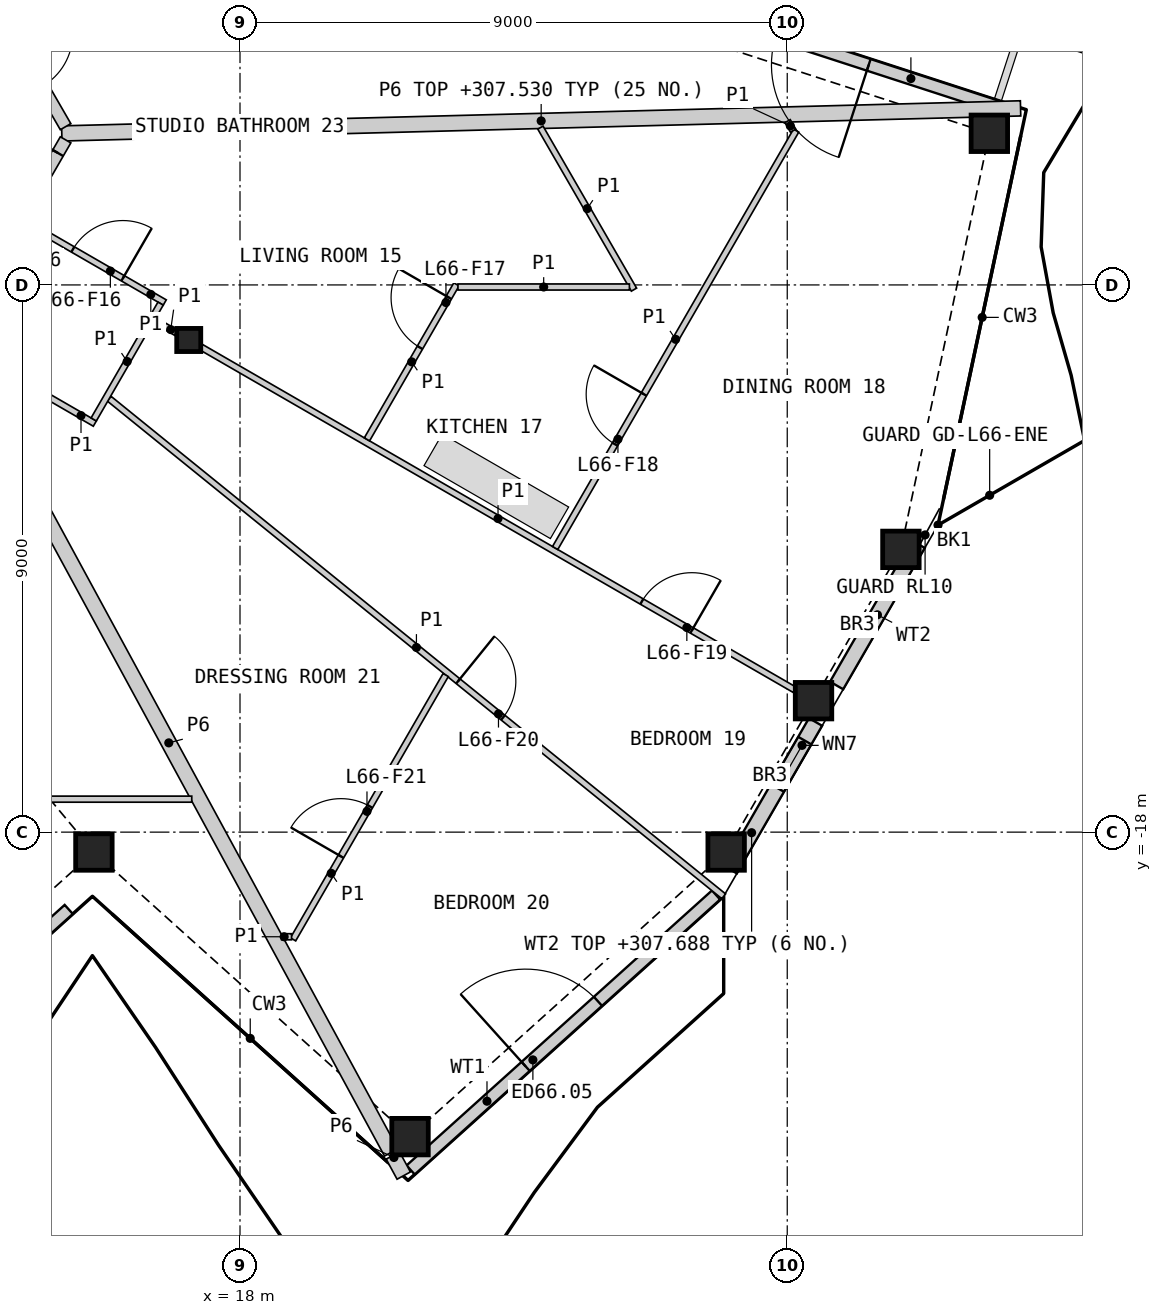
"""IFC4 building model, lengths in metres.
Left out: names, types, materials, properties, quantities, classifications, styles, units other than length and angle.
Written with IfcOpenShell. Run it as: python <this file> out.ifc"""

import sys

from ifc_helpers import new_model, si_unit, direction, frame, frame_2d, origin, origin_2d, place, context, subcontext, project, spatial, rectangle, hollow_rectangle, i_section, extrude, element, fill, save


model = new_model("IFC4")
c1 = context("Model", 3, precision=1e-05, world=origin(), true_north=direction((0.0, 1.0)))
c2 = subcontext(c1, "Body", "Model", "MODEL_VIEW")
j1 = project(units=[si_unit("LENGTHUNIT", "METRE"), si_unit("PLANEANGLEUNIT", "RADIAN")], contexts=[c1])
p1 = place(None, origin())
s1 = spatial("IfcSite", under=j1, at=p1, CompositionType="ELEMENT")
p2 = place(p1, origin())
s2 = spatial("IfcBuilding", under=s1, at=p2, CompositionType="ELEMENT")
p3 = place(p2, frame((0.0, 0.0, 305.2)))
s3 = spatial("IfcBuildingStorey", under=s2, at=p3, CompositionType="ELEMENT", Elevation=305.2)
for number, where, z_axis, x_axis in (
    (1, (15.597, -18.327, 0.0), (0.0, 0.0, 1.0), (1.0, 0.0, 0.0)),
    (2, (20.796, -23.008, 0.0), (0.0, 0.0, 1.0), (1.0, 0.0, 0.0)),
    (3, (25.995, -18.327, 0.0), (0.0, 0.0, 1.0), (1.0, 0.0, 0.0)),
    (4, (27.432, -15.838, 0.0), (0.0, 0.0, 1.0), (1.0, 0.0, 0.0)),
    (5, (28.869, -13.349, 0.0), (0.0, 0.0, 1.0), (1.0, 0.0, 0.0)),
    (6, (30.324, -6.506, 0.0), (0.0, 0.0, 1.0), (1.0, 0.0, 0.0)),
):
    element("IfcColumn", number, at=place(p3, frame(where, z_axis=z_axis, x_axis=x_axis)), inside=s3, PredefinedType="COLUMN", context=c2, shape_type="SweptSolid", body=[
        extrude(hollow_rectangle(XDim=0.6, YDim=0.6, WallThickness=0.04, at=origin_2d()), origin(), (0.0, 0.0, 1.0), 3.4),
    ])
p4 = place(p3, frame((17.157, -9.906, 0.0), z_axis=(0.0, 0.0, 1.0), x_axis=(1.0, 0.0, 0.0)))
e7 = element("IfcColumn", 7, at=p4, inside=s3, PredefinedType="COLUMN", context=c2, shape_type="SweptSolid", body=[
    extrude(i_section(OverallWidth=0.396, OverallDepth=0.381, WebThickness=0.019, FlangeThickness=0.03, at=origin_2d()), origin(), (0.0, 0.0, 1.0), 3.4),
])
p5 = place(p3, frame((10.485, -23.501, 0.0), z_axis=(0.0, 0.0, 1.0), x_axis=(0.743134744054, 0.669141802745, 0.0)))
e8 = element("IfcWall", 8, at=p5, inside=s3, PredefinedType="SOLIDWALL", context=c2, shape_type="SweptSolid", body=[
    extrude(rectangle(XDim=6.322, YDim=0.2, at=frame_2d((3.161, 0.0))), origin(), (0.0, 0.0, 1.0), 2.488),
])
p6 = place(p5, frame((2.463, 0.0, 0.0)))
e9 = element("IfcOpeningElement", 9, at=p6, cuts=e8, PredefinedType="OPENING", context=c2, shape_type="SweptSolid", body=[
    extrude(rectangle(XDim=1.6, YDim=2.25, at=frame_2d((0.8, 1.125))), frame((0.0, 0.11, 0.0), z_axis=(0.0, -1.0, 0.0), x_axis=(1.0, 0.0, 0.0)), (0.0, 0.0, 1.0), 0.22),
])
p7 = place(p3, frame((20.806, -23.556, 0.0), z_axis=(0.0, 0.0, 1.0), x_axis=(0.743145048269, 0.669130358924, 0.0)))
e10 = element("IfcWall", 10, at=p7, inside=s3, PredefinedType="SOLIDWALL", context=c2, shape_type="SweptSolid", body=[
    extrude(rectangle(XDim=6.759, YDim=0.2, at=frame_2d((3.379, 0.0))), origin(), (0.0, 0.0, 1.0), 2.488),
])
p8 = place(p7, frame((2.545, 0.0, 0.0)))
e11 = element("IfcOpeningElement", 11, at=p8, cuts=e10, PredefinedType="OPENING", context=c2, shape_type="SweptSolid", body=[
    extrude(rectangle(XDim=1.6, YDim=2.25, at=frame_2d((0.8, 1.125))), frame((0.0, 0.11, 0.0), z_axis=(0.0, -1.0, 0.0), x_axis=(1.0, 0.0, 0.0)), (0.0, 0.0, 1.0), 0.22),
])
p9 = place(p3, frame((26.063, -18.617, 0.0), z_axis=(0.0, 0.0, 1.0), x_axis=(0.499968627931, 0.866043515699, 0.0)))
e12 = element("IfcWall", 12, at=p9, inside=s3, PredefinedType="SOLIDWALL", context=c2, shape_type="SweptSolid", body=[
    extrude(rectangle(XDim=2.804, YDim=0.25, at=frame_2d((1.402, 0.0))), origin(), (0.0, 0.0, 1.0), 2.488),
])
p10 = place(p9, frame((1.55, 0.0, 1.6)))
e13 = element("IfcOpeningElement", 13, at=p10, cuts=e12, PredefinedType="OPENING", context=c2, shape_type="SweptSolid", body=[
    extrude(rectangle(XDim=0.9, YDim=0.6, at=frame_2d((0.45, 0.3))), frame((0.0, 0.135, 0.0), z_axis=(0.0, -1.0, 0.0), x_axis=(1.0, 0.0, 0.0)), (0.0, 0.0, 1.0), 0.27),
])
p11 = place(p3, frame((27.812, -15.588, 0.0), z_axis=(0.0, 0.0, 1.0), x_axis=(0.500032109083, 0.866006864803, 0.0)))
e14 = element("IfcWall", 14, at=p11, inside=s3, PredefinedType="SOLIDWALL", context=c2, shape_type="SweptSolid", body=[
    extrude(rectangle(XDim=2.684, YDim=0.25, at=frame_2d((1.342, 0.0))), origin(), (0.0, 0.0, 1.0), 2.488),
])
p12 = place(p3, frame((30.488, -6.078, 0.0), z_axis=(0.0, 0.0, 1.0), x_axis=(-0.951062515241, 0.308998530908, 0.0)))
e15 = element("IfcWall", 15, at=p12, inside=s3, PredefinedType="SOLIDWALL", context=c2, shape_type="SweptSolid", body=[
    extrude(rectangle(XDim=6.117, YDim=0.2, at=frame_2d((3.059, 0.0))), origin(), (0.0, 0.0, 1.0), 2.488),
])
p13 = place(p12, frame((2.259, 0.0, 0.0)))
e16 = element("IfcOpeningElement", 16, at=p13, cuts=e15, PredefinedType="OPENING", context=c2, shape_type="SweptSolid", body=[
    extrude(rectangle(XDim=1.6, YDim=2.25, at=frame_2d((0.8, 1.125))), frame((0.0, 0.11, 0.0), z_axis=(0.0, -1.0, 0.0), x_axis=(1.0, 0.0, 0.0)), (0.0, 0.0, 1.0), 0.22),
])
p14 = place(p3, frame((15.069, -6.509, 0.0), z_axis=(0.0, 0.0, 1.0), x_axis=(0.999657828615, 0.026157708023, 0.0)))
e17 = element("IfcWall", 17, at=p14, inside=s3, PredefinedType="PARTITIONING", context=c2, shape_type="SweptSolid", body=[
    extrude(rectangle(XDim=15.773, YDim=0.25, at=frame_2d((7.887, 0.0))), origin(), (0.0, 0.0, 1.0), 2.33),
])
p15 = place(p3, frame((13.171, -9.796, 0.0), z_axis=(0.0, 0.0, 1.0), x_axis=(0.477178668135, -0.878806303275, 0.0)))
e18 = element("IfcWall", 18, at=p15, inside=s3, PredefinedType="PARTITIONING", context=c2, shape_type="SweptSolid", body=[
    extrude(rectangle(XDim=15.33, YDim=0.25, at=frame_2d((7.665, 0.0))), origin(), (0.0, 0.0, 1.0), 2.33),
])
p16 = place(p3, frame((12.988, -2.684, 0.0), z_axis=(0.0, 0.0, 1.0), x_axis=(0.500003406062, -0.866023437285, 0.0)))
e19 = element("IfcWall", 19, at=p16, inside=s3, PredefinedType="PARTITIONING", context=c2, shape_type="SweptSolid", body=[
    extrude(rectangle(XDim=4.288, YDim=0.2, at=frame_2d((2.144, 0.0))), origin(), (0.0, 0.0, 1.0), 3.1),
])
p17 = place(p16, frame((2.521, 0.0, 0.0)))
e20 = element("IfcOpeningElement", 20, at=p17, cuts=e19, PredefinedType="OPENING", context=c2, shape_type="SweptSolid", body=[
    extrude(rectangle(XDim=1.0, YDim=2.1, at=frame_2d((0.5, 1.05))), frame((0.0, 0.11, 0.0), z_axis=(0.0, -1.0, 0.0), x_axis=(1.0, 0.0, 0.0)), (0.0, 0.0, 1.0), 0.22),
])
p18 = place(p3, frame((13.293, -9.797, 0.0), z_axis=(0.0, 0.0, 1.0), x_axis=(0.499967746641, 0.866044024469, 0.0)))
e21 = element("IfcWall", 21, at=p18, inside=s3, PredefinedType="PARTITIONING", context=c2, shape_type="SweptSolid", body=[
    extrude(rectangle(XDim=3.676, YDim=0.2, at=frame_2d((1.838, 0.0))), origin(), (0.0, 0.0, 1.0), 3.1),
])
p19 = place(p18, frame((2.426, 0.0, 0.0)))
e22 = element("IfcOpeningElement", 22, at=p19, cuts=e21, PredefinedType="OPENING", context=c2, shape_type="SweptSolid", body=[
    extrude(rectangle(XDim=1.0, YDim=2.1, at=frame_2d((0.5, 1.05))), frame((0.0, 0.11, 0.0), z_axis=(0.0, -1.0, 0.0), x_axis=(1.0, 0.0, 0.0)), (0.0, 0.0, 1.0), 0.22),
])
p20 = place(p3, frame((20.514, -23.318, 0.0), z_axis=(0.0, 0.0, 1.0), x_axis=(0.477077538769, -0.878861207474, 0.0)))
e23 = element("IfcWall", 23, at=p20, inside=s3, PredefinedType="PARTITIONING", context=c2, shape_type="SweptSolid", body=[
    extrude(rectangle(XDim=0.376, YDim=0.25, at=frame_2d((0.188, 0.0))), origin(), (0.0, 0.0, 1.0), 2.33),
])
p21 = place(p3, frame((15.848, -10.871, 0.0), z_axis=(0.0, 0.0, 1.0), x_axis=(0.77713687197, -0.629331615465, 0.0)))
e24 = element("IfcWall", 24, at=p21, inside=s3, PredefinedType="PARTITIONING", context=c2, shape_type="SweptSolid", body=[
    extrude(rectangle(XDim=13.004, YDim=0.1, at=frame_2d((6.502, 0.0))), origin(), (0.0, 0.0, 1.0), 2.33),
])
p22 = place(p21, frame((7.384, 0.0, 0.0)))
e25 = element("IfcOpeningElement", 25, at=p22, cuts=e24, PredefinedType="OPENING", context=c2, shape_type="SweptSolid", body=[
    extrude(rectangle(XDim=0.95, YDim=2.1, at=frame_2d((0.475, 1.05))), frame((0.0, 0.06, 0.0), z_axis=(0.0, -1.0, 0.0), x_axis=(1.0, 0.0, 0.0)), (0.0, 0.0, 1.0), 0.12),
])
p23 = place(p3, frame((17.365, -10.025, 0.0), z_axis=(0.0, 0.0, 1.0), x_axis=(0.866021046153, -0.500007547564, 0.0)))
e26 = element("IfcWall", 26, at=p23, inside=s3, PredefinedType="PARTITIONING", context=c2, shape_type="SweptSolid", body=[
    extrude(rectangle(XDim=11.267, YDim=0.1, at=frame_2d((5.634, 0.0))), origin(), (0.0, 0.0, 1.0), 2.33),
])
p24 = place(p23, frame((8.364, 0.0, 0.0)))
e27 = element("IfcOpeningElement", 27, at=p24, cuts=e26, PredefinedType="OPENING", context=c2, shape_type="SweptSolid", body=[
    extrude(rectangle(XDim=0.95, YDim=2.1, at=frame_2d((0.475, 1.05))), frame((0.0, 0.06, 0.0), z_axis=(0.0, -1.0, 0.0), x_axis=(1.0, 0.0, 0.0)), (0.0, 0.0, 1.0), 0.12),
])
p25 = place(p3, frame((23.183, -13.327, 0.0), z_axis=(0.0, 0.0, 1.0), x_axis=(0.499991741039, 0.866030172045, 0.0)))
e28 = element("IfcWall", 28, at=p25, inside=s3, PredefinedType="PARTITIONING", context=c2, shape_type="SweptSolid", body=[
    extrude(rectangle(XDim=7.927, YDim=0.1, at=frame_2d((3.963, 0.0))), origin(), (0.0, 0.0, 1.0), 2.33),
])
p26 = place(p25, frame((1.97, 0.0, 0.0)))
e29 = element("IfcOpeningElement", 29, at=p26, cuts=e28, PredefinedType="OPENING", context=c2, shape_type="SweptSolid", body=[
    extrude(rectangle(XDim=0.95, YDim=2.1, at=frame_2d((0.475, 1.05))), frame((0.0, 0.06, 0.0), z_axis=(0.0, -1.0, 0.0), x_axis=(1.0, 0.0, 0.0)), (0.0, 0.0, 1.0), 0.12),
])
p27 = place(p3, frame((10.432, -17.458, 0.0), z_axis=(0.0, 0.0, 1.0), x_axis=(1.0, 0.0, 0.0)))
e30 = element("IfcWall", 30, at=p27, inside=s3, PredefinedType="PARTITIONING", context=c2, shape_type="SweptSolid", body=[
    extrude(rectangle(XDim=6.775, YDim=0.1, at=frame_2d((3.387, 0.0))), origin(), (0.0, 0.0, 1.0), 2.33),
])
p28 = place(p27, frame((0.752, 0.0, 0.0)))
e31 = element("IfcOpeningElement", 31, at=p28, cuts=e30, PredefinedType="OPENING", context=c2, shape_type="SweptSolid", body=[
    extrude(rectangle(XDim=0.95, YDim=2.1, at=frame_2d((0.475, 1.05))), frame((0.0, 0.06, 0.0), z_axis=(0.0, -1.0, 0.0), x_axis=(1.0, 0.0, 0.0)), (0.0, 0.0, 1.0), 0.12),
])
p29 = place(p3, frame((18.873, -19.764, 0.0), z_axis=(0.0, 0.0, 1.0), x_axis=(0.499983455602, 0.866034955486, 0.0)))
e32 = element("IfcWall", 32, at=p29, inside=s3, PredefinedType="PARTITIONING", context=c2, shape_type="SweptSolid", body=[
    extrude(rectangle(XDim=5.02, YDim=0.1, at=frame_2d((2.51, 0.0))), origin(), (0.0, 0.0, 1.0), 2.33),
])
p30 = place(p29, frame((1.576, 0.0, 0.0)))
e33 = element("IfcOpeningElement", 33, at=p30, cuts=e32, PredefinedType="OPENING", context=c2, shape_type="SweptSolid", body=[
    extrude(rectangle(XDim=0.95, YDim=2.1, at=frame_2d((0.475, 1.05))), frame((0.0, 0.06, 0.0), z_axis=(0.0, -1.0, 0.0), x_axis=(1.0, 0.0, 0.0)), (0.0, 0.0, 1.0), 0.12),
])
p31 = place(p3, frame((22.941, -6.413, 0.0), z_axis=(0.0, 0.0, 1.0), x_axis=(0.500013199183, -0.866017783098, 0.0)))
e34 = element("IfcWall", 34, at=p31, inside=s3, PredefinedType="PARTITIONING", context=c2, shape_type="SweptSolid", body=[
    extrude(rectangle(XDim=3.077, YDim=0.1, at=frame_2d((1.539, 0.0))), origin(), (0.0, 0.0, 1.0), 2.33),
])
p32 = place(p3, frame((20.088, -11.54, 0.0), z_axis=(0.0, 0.0, 1.0), x_axis=(0.500055103712, 0.865993587304, 0.0)))
e35 = element("IfcWall", 35, at=p32, inside=s3, PredefinedType="PARTITIONING", context=c2, shape_type="SweptSolid", body=[
    extrude(rectangle(XDim=2.944, YDim=0.1, at=frame_2d((1.472, 0.0))), origin(), (0.0, 0.0, 1.0), 2.33),
])
p33 = place(p32, frame((1.744, 0.0, 0.0)))
e36 = element("IfcOpeningElement", 36, at=p33, cuts=e35, PredefinedType="OPENING", context=c2, shape_type="SweptSolid", body=[
    extrude(rectangle(XDim=0.95, YDim=2.1, at=frame_2d((0.475, 1.05))), frame((0.0, 0.06, 0.0), z_axis=(0.0, -1.0, 0.0), x_axis=(1.0, 0.0, 0.0)), (0.0, 0.0, 1.0), 0.12),
])
p34 = place(p3, frame((21.584, -9.034, 0.0), z_axis=(0.0, 0.0, 1.0), x_axis=(1.0, 0.0, 0.0)))
e37 = element("IfcWall", 37, at=p34, inside=s3, PredefinedType="PARTITIONING", context=c2, shape_type="SweptSolid", body=[
    extrude(rectangle(XDim=2.82, YDim=0.1, at=frame_2d((1.41, 0.0))), origin(), (0.0, 0.0, 1.0), 2.33),
])
p35 = place(p3, frame((14.468, -7.964, 0.0), z_axis=(0.0, 0.0, 1.0), x_axis=(0.865989200783, -0.500062700197, 0.0)))
e38 = element("IfcWall", 38, at=p35, inside=s3, PredefinedType="PARTITIONING", context=c2, shape_type="SweptSolid", body=[
    extrude(rectangle(XDim=2.65, YDim=0.1, at=frame_2d((1.325, 0.0))), origin(), (0.0, 0.0, 1.0), 2.33),
])
p36 = place(p35, frame((0.905, 0.0, 0.0)))
e39 = element("IfcOpeningElement", 39, at=p36, cuts=e38, PredefinedType="OPENING", context=c2, shape_type="SweptSolid", body=[
    extrude(rectangle(XDim=0.95, YDim=2.1, at=frame_2d((0.475, 1.05))), frame((0.0, 0.06, 0.0), z_axis=(0.0, -1.0, 0.0), x_axis=(1.0, 0.0, 0.0)), (0.0, 0.0, 1.0), 0.12),
])
p37 = place(p3, frame((13.339, -9.968, 0.0), z_axis=(0.0, 0.0, 1.0), x_axis=(0.866036909293, -0.499980071345, 0.0)))
e40 = element("IfcWall", 40, at=p37, inside=s3, PredefinedType="PARTITIONING", context=c2, shape_type="SweptSolid", body=[
    extrude(rectangle(XDim=2.625, YDim=0.1, at=frame_2d((1.312, 0.0))), origin(), (0.0, 0.0, 1.0), 2.33),
])
p38 = place(p3, frame((15.594, -11.212, 0.0), z_axis=(0.0, 0.0, 1.0), x_axis=(0.499898558967, 0.866083962871, 0.0)))
e41 = element("IfcWall", 41, at=p38, inside=s3, PredefinedType="PARTITIONING", context=c2, shape_type="SweptSolid", body=[
    extrude(rectangle(XDim=2.2, YDim=0.1, at=frame_2d((1.1, 0.0))), origin(), (0.0, 0.0, 1.0), 2.33),
])
p39 = place(p3, frame((16.594, -9.581, 0.0), z_axis=(0.0, 0.0, 1.0), x_axis=(0.866036909293, -0.499980071345, 0.0)))
e42 = element("IfcWall", 42, at=p39, inside=s3, PredefinedType="PARTITIONING", context=c2, shape_type="SweptSolid", body=[
    extrude(rectangle(XDim=0.41, YDim=0.1, at=frame_2d((0.205, 0.0))), origin(), (0.0, 0.0, 1.0), 2.33),
])
p40 = place(p3, frame((27.006, -6.306, 0.0), z_axis=(0.0, 0.0, 1.0), x_axis=(0.500074377092, -0.865982457891, 0.0)))
e43 = element("IfcWall", 43, at=p40, inside=s3, PredefinedType="PARTITIONING", context=c2, shape_type="SweptSolid", body=[
    extrude(rectangle(XDim=0.18, YDim=0.1, at=frame_2d((0.09, 0.0))), origin(), (0.0, 0.0, 1.0), 2.33),
])
p41 = place(p3, frame((18.685, -19.721, 0.0), z_axis=(0.0, 0.0, 1.0), x_axis=(1.0, 0.0, 0.0)))
e44 = element("IfcWall", 44, at=p41, inside=s3, PredefinedType="PARTITIONING", context=c2, shape_type="SweptSolid", body=[
    extrude(rectangle(XDim=0.162, YDim=0.1, at=frame_2d((0.081, 0.0))), origin(), (0.0, 0.0, 1.0), 2.33),
])
p42 = place(p8, origin())
e45 = element("IfcDoor", 45, at=p42, inside=s3, OperationType="DOUBLE_DOOR_SINGLE_SWING", PredefinedType="DOOR", context=c2, shape_type="SweptSolid", body=[
    extrude(rectangle(XDim=1.6, YDim=2.25, at=frame_2d((0.8, 1.125))), frame((0.0, 0.025, 0.0), z_axis=(0.0, -1.0, 0.0), x_axis=(1.0, 0.0, 0.0)), (0.0, 0.0, 1.0), 0.05),
])
fill(e11, e45)
p43 = place(p10, origin())
e46 = element("IfcWindow", 46, at=p43, inside=s3, PartitioningType="SINGLE_PANEL", PredefinedType="WINDOW", context=c2, shape_type="SweptSolid", body=[
    extrude(rectangle(XDim=0.9, YDim=0.6, at=frame_2d((0.45, 0.3))), frame((0.0, 0.03, 0.0), z_axis=(0.0, -1.0, 0.0), x_axis=(1.0, 0.0, 0.0)), (0.0, 0.0, 1.0), 0.06),
])
fill(e13, e46)
p44 = place(p13, origin())
e47 = element("IfcDoor", 47, at=p44, inside=s3, OperationType="DOUBLE_DOOR_SINGLE_SWING", PredefinedType="DOOR", context=c2, shape_type="SweptSolid", body=[
    extrude(rectangle(XDim=1.6, YDim=2.25, at=frame_2d((0.8, 1.125))), frame((0.0, 0.025, 0.0), z_axis=(0.0, -1.0, 0.0), x_axis=(1.0, 0.0, 0.0)), (0.0, 0.0, 1.0), 0.05),
])
fill(e16, e47)
p45 = place(p19, origin())
e48 = element("IfcDoor", 48, at=p45, inside=s3, OperationType="SINGLE_SWING_RIGHT", PredefinedType="DOOR", context=c2, shape_type="SweptSolid", body=[
    extrude(rectangle(XDim=1.0, YDim=2.1, at=frame_2d((0.5, 1.05))), frame((0.0, 0.025, 0.0), z_axis=(0.0, -1.0, 0.0), x_axis=(1.0, 0.0, 0.0)), (0.0, 0.0, 1.0), 0.05),
])
fill(e22, e48)
p46 = place(p36, origin())
e49 = element("IfcDoor", 49, at=p46, inside=s3, OperationType="SINGLE_SWING_RIGHT", PredefinedType="DOOR", context=c2, shape_type="SweptSolid", body=[
    extrude(rectangle(XDim=0.95, YDim=2.1, at=frame_2d((0.475, 1.05))), frame((0.0, 0.025, 0.0), z_axis=(0.0, -1.0, 0.0), x_axis=(1.0, 0.0, 0.0)), (0.0, 0.0, 1.0), 0.05),
])
fill(e39, e49)
p47 = place(p33, origin())
e50 = element("IfcDoor", 50, at=p47, inside=s3, OperationType="SINGLE_SWING_RIGHT", PredefinedType="DOOR", context=c2, shape_type="SweptSolid", body=[
    extrude(rectangle(XDim=0.95, YDim=2.1, at=frame_2d((0.475, 1.05))), frame((0.0, 0.025, 0.0), z_axis=(0.0, -1.0, 0.0), x_axis=(1.0, 0.0, 0.0)), (0.0, 0.0, 1.0), 0.05),
])
fill(e36, e50)
p48 = place(p26, origin())
e51 = element("IfcDoor", 51, at=p48, inside=s3, OperationType="SINGLE_SWING_RIGHT", PredefinedType="DOOR", context=c2, shape_type="SweptSolid", body=[
    extrude(rectangle(XDim=0.95, YDim=2.1, at=frame_2d((0.475, 1.05))), frame((0.0, 0.025, 0.0), z_axis=(0.0, -1.0, 0.0), x_axis=(1.0, 0.0, 0.0)), (0.0, 0.0, 1.0), 0.05),
])
fill(e29, e51)
p49 = place(p24, origin())
e52 = element("IfcDoor", 52, at=p49, inside=s3, OperationType="SINGLE_SWING_RIGHT", PredefinedType="DOOR", context=c2, shape_type="SweptSolid", body=[
    extrude(rectangle(XDim=0.95, YDim=2.1, at=frame_2d((0.475, 1.05))), frame((0.0, 0.025, 0.0), z_axis=(0.0, -1.0, 0.0), x_axis=(1.0, 0.0, 0.0)), (0.0, 0.0, 1.0), 0.05),
])
fill(e27, e52)
p50 = place(p22, origin())
e53 = element("IfcDoor", 53, at=p50, inside=s3, OperationType="SINGLE_SWING_LEFT", PredefinedType="DOOR", context=c2, shape_type="SweptSolid", body=[
    extrude(rectangle(XDim=0.95, YDim=2.1, at=frame_2d((0.475, 1.05))), frame((0.0, 0.025, 0.0), z_axis=(0.0, -1.0, 0.0), x_axis=(1.0, 0.0, 0.0)), (0.0, 0.0, 1.0), 0.05),
])
fill(e25, e53)
p51 = place(p30, origin())
e54 = element("IfcDoor", 54, at=p51, inside=s3, OperationType="SINGLE_SWING_LEFT", PredefinedType="DOOR", context=c2, shape_type="SweptSolid", body=[
    extrude(rectangle(XDim=0.95, YDim=2.1, at=frame_2d((0.475, 1.05))), frame((0.0, 0.025, 0.0), z_axis=(0.0, -1.0, 0.0), x_axis=(1.0, 0.0, 0.0)), (0.0, 0.0, 1.0), 0.05),
])
fill(e33, e54)
save(model, sys.argv[1])
